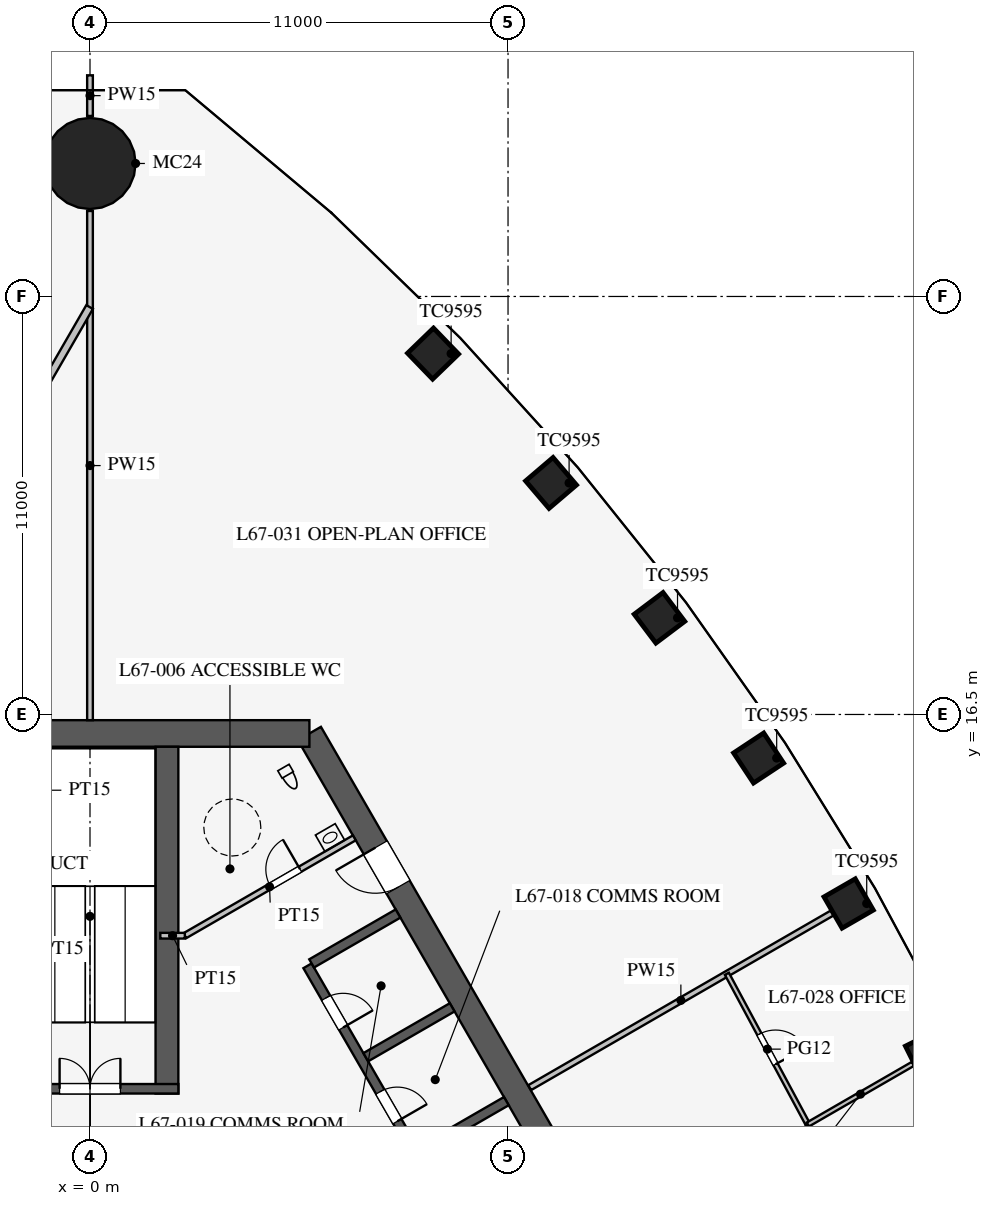
"""IFC4 building model, lengths in metres.
Left out: names, types, materials, properties, quantities, classifications, styles, units other than length and angle.
Written with IfcOpenShell. Run it as: python <this file> out.ifc"""

import sys

from ifc_helpers import new_model, si_unit, direction, frame, frame_2d, origin, origin_2d, place, context, subcontext, project, spatial, rectangle, circle, extrude, element, fill, save


model = new_model("IFC4")
c1 = context("Model", 3, precision=1e-05, world=origin(), true_north=direction((0.0, 1.0)))
c2 = subcontext(c1, "Body", "Model", "MODEL_VIEW")
j1 = project(units=[si_unit("LENGTHUNIT", "METRE"), si_unit("PLANEANGLEUNIT", "RADIAN")], contexts=[c1])
p1 = place(None, origin())
s1 = spatial("IfcSite", under=j1, at=p1, CompositionType="ELEMENT")
p2 = place(p1, origin())
s2 = spatial("IfcBuilding", under=s1, at=p2, CompositionType="ELEMENT")
p3 = place(p2, frame((0.0, 0.0, 293.1)))
s3 = spatial("IfcBuildingStorey", under=s2, at=p3, CompositionType="ELEMENT", Elevation=293.1)
for number, where, z_axis, x_axis in (
    (1, (22.094, 7.56, 0.0), (0.0, 0.0, 1.0), (-0.447, 0.895, 0.0)),
    (2, (19.963, 11.526, 0.0), (0.0, 0.0, 1.0), (-0.5, 0.866, 0.0)),
    (3, (17.594, 15.354, 0.0), (0.0, 0.0, 1.0), (-0.552, 0.834, 0.0)),
    (4, (14.985, 19.044, 0.0), (0.0, 0.0, 1.0), (-0.601, 0.799, 0.0)),
    (5, (12.132, 22.593, 0.0), (0.0, 0.0, 1.0), (-0.649, 0.761, 0.0)),
    (6, (9.027, 25.997, 0.0), (0.0, 0.0, 1.0), (-0.695, 0.719, 0.0)),
):
    element("IfcColumn", number, at=place(p3, frame(where, z_axis=z_axis, x_axis=x_axis)), inside=s3, PredefinedType="COLUMN", context=c2, shape_type="SweptSolid", body=[
        extrude(rectangle(XDim=0.95, YDim=0.95, at=origin_2d()), origin(), (0.0, 0.0, 1.0), 4.2),
    ])
p4 = place(p3, frame((0.0, 31.0, 0.0), z_axis=(0.0, 0.0, 1.0), x_axis=(1.0, 0.0, 0.0)))
e7 = element("IfcColumn", 7, at=p4, inside=s3, PredefinedType="COLUMN", context=c2, shape_type="SweptSolid", body=[
    extrude(circle(Radius=1.2, at=origin_2d()), origin(), (0.0, 0.0, 1.0), 4.2),
])
p5 = place(p3, frame((16.743, -3.0, 0.0), z_axis=(0.0, 0.0, 1.0), x_axis=(-0.500002442456, 0.866023993627, 0.0)))
e8 = element("IfcWall", 8, at=p5, inside=s3, PredefinedType="SHEAR", context=c2, shape_type="SweptSolid", body=[
    extrude(rectangle(XDim=21.939, YDim=0.7, at=frame_2d((10.97, 0.0))), origin(), (0.0, 0.0, 1.0), 4.2),
])
p6 = place(p5, frame((17.27, 0.0, 0.0)))
e9 = element("IfcOpeningElement", 9, at=p6, cuts=e8, PredefinedType="OPENING", context=c2, shape_type="SweptSolid", body=[
    extrude(rectangle(XDim=1.2, YDim=2.1, at=frame_2d((0.6, 1.05))), frame((0.0, 0.36, 0.0), z_axis=(0.0, -1.0, 0.0), x_axis=(1.0, 0.0, 0.0)), (0.0, 0.0, 1.0), 0.72),
])
p7 = place(p5, frame((3.47, 0.0, 0.0)))
e10 = element("IfcOpeningElement", 10, at=p7, cuts=e8, PredefinedType="OPENING", context=c2, shape_type="SweptSolid", body=[
    extrude(rectangle(XDim=1.2, YDim=2.1, at=frame_2d((0.6, 1.05))), frame((0.0, 0.36, 0.0), z_axis=(0.0, -1.0, 0.0), x_axis=(1.0, 0.0, 0.0)), (0.0, 0.0, 1.0), 0.72),
])
p8 = place(p3, frame((5.773, 16.0, 0.0), z_axis=(0.0, 0.0, 1.0), x_axis=(-1.0, 0.0, 0.0)))
e11 = element("IfcWall", 11, at=p8, inside=s3, PredefinedType="SHEAR", context=c2, shape_type="SweptSolid", body=[
    extrude(rectangle(XDim=11.547, YDim=0.7, at=frame_2d((5.773, 0.0))), origin(), (0.0, 0.0, 1.0), 4.2),
])
p9 = place(p3, frame((11.424, 0.014, 0.0), z_axis=(0.0, 0.0, 1.0), x_axis=(-0.500001763848, 0.866024385424, 0.0)))
e12 = element("IfcWall", 12, at=p9, inside=s3, PredefinedType="SHEAR", context=c2, shape_type="SweptSolid", body=[
    extrude(rectangle(XDim=11.4, YDim=0.25, at=frame_2d((5.7, 0.0))), origin(), (0.0, 0.0, 1.0), 4.2),
])
p10 = place(p9, frame((0.975, 0.0, 0.0)))
e13 = element("IfcOpeningElement", 13, at=p10, cuts=e12, PredefinedType="OPENING", context=c2, shape_type="SweptSolid", body=[
    extrude(rectangle(XDim=0.9, YDim=2.1, at=frame_2d((0.45, 1.05))), frame((0.0, 0.135, 0.0), z_axis=(0.0, -1.0, 0.0), x_axis=(1.0, 0.0, 0.0)), (0.0, 0.0, 1.0), 0.27),
])
p11 = place(p9, frame((3.825, 0.0, 0.0)))
e14 = element("IfcOpeningElement", 14, at=p11, cuts=e12, PredefinedType="OPENING", context=c2, shape_type="SweptSolid", body=[
    extrude(rectangle(XDim=0.9, YDim=2.1, at=frame_2d((0.45, 1.05))), frame((0.0, 0.135, 0.0), z_axis=(0.0, -1.0, 0.0), x_axis=(1.0, 0.0, 0.0)), (0.0, 0.0, 1.0), 0.27),
])
p12 = place(p9, frame((6.675, 0.0, 0.0)))
e15 = element("IfcOpeningElement", 15, at=p12, cuts=e12, PredefinedType="OPENING", context=c2, shape_type="SweptSolid", body=[
    extrude(rectangle(XDim=0.9, YDim=2.1, at=frame_2d((0.45, 1.05))), frame((0.0, 0.135, 0.0), z_axis=(0.0, -1.0, 0.0), x_axis=(1.0, 0.0, 0.0)), (0.0, 0.0, 1.0), 0.27),
])
p13 = place(p9, frame((9.525, 0.0, 0.0)))
e16 = element("IfcOpeningElement", 16, at=p13, cuts=e12, PredefinedType="OPENING", context=c2, shape_type="SweptSolid", body=[
    extrude(rectangle(XDim=0.9, YDim=2.1, at=frame_2d((0.45, 1.05))), frame((0.0, 0.135, 0.0), z_axis=(0.0, -1.0, 0.0), x_axis=(1.0, 0.0, 0.0)), (0.0, 0.0, 1.0), 0.27),
])
for number, where, z_axis, x_axis in (
    (17, (8.682, 5.012, 0.0), (0.0, 0.0, 1.0), (0.866, 0.5, 0.0)),
    (18, (7.257, 7.481, 0.0), (0.0, 0.0, 1.0), (0.866, 0.5, 0.0)),
    (19, (5.832, 9.949, 0.0), (0.0, 0.0, 1.0), (0.866, 0.5, 0.0)),
):
    element("IfcWall", number, at=place(p3, frame(where, z_axis=z_axis, x_axis=x_axis)), inside=s3, PredefinedType="SHEAR", context=c2, shape_type="SweptSolid", body=[
        extrude(rectangle(XDim=2.625, YDim=0.25, at=frame_2d((1.312, 0.0))), origin(), (0.0, 0.0, 1.0), 4.2),
    ])
p14 = place(p3, frame((2.025, 6.525, 0.0), z_axis=(0.0, 0.0, 1.0), x_axis=(0.0, 1.0, 0.0)))
e20 = element("IfcWall", 20, at=p14, inside=s3, PredefinedType="SHEAR", context=c2, shape_type="SweptSolid", body=[
    extrude(rectangle(XDim=9.125, YDim=0.6, at=frame_2d((4.562, 0.0))), origin(), (0.0, 0.0, 1.0), 4.2),
])
p15 = place(p3, frame((2.325, 6.65, 0.0), z_axis=(0.0, 0.0, 1.0), x_axis=(-1.0, 0.0, 0.0)))
e21 = element("IfcWall", 21, at=p15, inside=s3, PredefinedType="SHEAR", context=c2, shape_type="SweptSolid", body=[
    extrude(rectangle(XDim=4.65, YDim=0.25, at=frame_2d((2.325, 0.0))), origin(), (0.0, 0.0, 1.0), 4.2),
])
p16 = place(p15, frame((1.525, 0.0, 0.0)))
e22 = element("IfcOpeningElement", 22, at=p16, cuts=e21, PredefinedType="OPENING", context=c2, shape_type="SweptSolid", body=[
    extrude(rectangle(XDim=1.6, YDim=2.1, at=frame_2d((0.8, 1.05))), frame((0.0, 0.135, 0.0), z_axis=(0.0, -1.0, 0.0), x_axis=(1.0, 0.0, 0.0)), (0.0, 0.0, 1.0), 0.27),
])
p17 = place(p3, frame((2.495, 10.678, 0.0), z_axis=(0.0, 0.0, 1.0), x_axis=(0.866037967349, 0.499978238636, 0.0)))
e23 = element("IfcWall", 23, at=p17, inside=s3, PredefinedType="PARTITIONING", context=c2, shape_type="SweptSolid", body=[
    extrude(rectangle(XDim=5.15, YDim=0.15, at=frame_2d((2.575, 0.0))), origin(), (0.0, 0.0, 1.0), 4.0),
])
p18 = place(p17, frame((2.6, 0.0, 0.0)))
e24 = element("IfcOpeningElement", 24, at=p18, cuts=e23, PredefinedType="OPENING", context=c2, shape_type="SweptSolid", body=[
    extrude(rectangle(XDim=0.9, YDim=2.1, at=frame_2d((0.45, 1.05))), frame((0.0, 0.085, 0.0), z_axis=(0.0, -1.0, 0.0), x_axis=(1.0, 0.0, 0.0)), (0.0, 0.0, 1.0), 0.17),
])
p19 = place(p3, frame((2.495, 10.678, 0.0), z_axis=(0.0, 0.0, 1.0), x_axis=(-1.0, 0.0, 0.0)))
e25 = element("IfcWall", 25, at=p19, inside=s3, PredefinedType="PARTITIONING", context=c2, shape_type="SweptSolid", body=[
    extrude(rectangle(XDim=0.645, YDim=0.15, at=frame_2d((0.323, 0.0))), origin(), (0.0, 0.0, 1.0), 4.0),
])
p20 = place(p3, frame((0.0, 16.35, 0.0), z_axis=(0.0, 0.0, 1.0), x_axis=(0.0, 1.0, 0.0)))
e26 = element("IfcWall", 26, at=p20, inside=s3, PredefinedType="PARTITIONING", context=c2, shape_type="SweptSolid", body=[
    extrude(rectangle(XDim=13.4, YDim=0.15, at=frame_2d((6.7, 0.0))), origin(), (0.0, 0.0, 1.0), 2.5),
])
p21 = place(p3, frame((0.0, 32.25, 0.0), z_axis=(0.0, 0.0, 1.0), x_axis=(0.0, 1.0, 0.0)))
e27 = element("IfcWall", 27, at=p21, inside=s3, PredefinedType="PARTITIONING", context=c2, shape_type="SweptSolid", body=[
    extrude(rectangle(XDim=1.07, YDim=0.15, at=frame_2d((0.535, 0.0))), origin(), (0.0, 0.0, 1.0), 2.5),
])
p22 = place(p3, frame((11.57, 6.68, 0.0), z_axis=(0.0, 0.0, 1.0), x_axis=(0.866026706704, 0.49999774327, 0.0)))
e28 = element("IfcWall", 28, at=p22, inside=s3, PredefinedType="PARTITIONING", context=c2, shape_type="SweptSolid", body=[
    extrude(rectangle(XDim=9.187, YDim=0.15, at=frame_2d((4.593, 0.0))), origin(), (0.0, 0.0, 1.0), 3.3),
])
p23 = place(p3, frame((18.891, 5.71, 0.0), z_axis=(0.0, 0.0, 1.0), x_axis=(-0.473524102582, 0.880780860529, 0.0)))
e29 = element("IfcWall", 29, at=p23, inside=s3, PredefinedType="PARTITIONING", context=c2, shape_type="SweptSolid", body=[
    extrude(rectangle(XDim=4.502, YDim=0.12, at=frame_2d((2.251, 0.0))), origin(), (0.0, 0.0, 1.0), 2.9),
])
p24 = place(p23, frame((1.8, 0.0, 0.15)))
e30 = element("IfcOpeningElement", 30, at=p24, cuts=e29, PredefinedType="OPENING", context=c2, shape_type="SweptSolid", body=[
    extrude(rectangle(XDim=0.9, YDim=2.1, at=frame_2d((0.45, 1.05))), frame((0.0, 0.07, 0.0), z_axis=(0.0, -1.0, 0.0), x_axis=(1.0, 0.0, 0.0)), (0.0, 0.0, 1.0), 0.14),
])
p25 = place(p3, frame((20.786, 1.608, 0.0), z_axis=(0.0, 0.0, 1.0), x_axis=(-0.419335693458, 0.907831248742, 0.0)))
e31 = element("IfcWall", 31, at=p25, inside=s3, PredefinedType="PARTITIONING", context=c2, shape_type="SweptSolid", body=[
    extrude(rectangle(XDim=4.519, YDim=0.12, at=frame_2d((2.259, 0.0))), origin(), (0.0, 0.0, 1.0), 2.9),
])
p26 = place(p25, frame((1.8, 0.0, 0.15)))
e32 = element("IfcOpeningElement", 32, at=p26, cuts=e31, PredefinedType="OPENING", context=c2, shape_type="SweptSolid", body=[
    extrude(rectangle(XDim=0.9, YDim=2.1, at=frame_2d((0.45, 1.05))), frame((0.0, 0.07, 0.0), z_axis=(0.0, -1.0, 0.0), x_axis=(1.0, 0.0, 0.0)), (0.0, 0.0, 1.0), 0.14),
])
p27 = place(p3, frame((18.891, 5.71, 0.0), z_axis=(0.0, 0.0, 1.0), x_axis=(0.866008575759, 0.500029145862, 0.0)))
e33 = element("IfcWall", 33, at=p27, inside=s3, PredefinedType="PARTITIONING", context=c2, shape_type="SweptSolid", body=[
    extrude(rectangle(XDim=3.193, YDim=0.12, at=frame_2d((1.596, 0.0))), origin(), (0.0, 0.0, 1.0), 2.9),
])
p28 = place(p3, frame((-5.045, 18.501, 0.0), z_axis=(0.0, 0.0, 1.0), x_axis=(0.499990381663, 0.866030956863, 0.0)))
e34 = element("IfcWall", 34, at=p28, inside=s3, PredefinedType="PARTITIONING", context=c2, shape_type="SweptSolid", body=[
    extrude(rectangle(XDim=10.07, YDim=0.2, at=frame_2d((5.035, 0.0))), origin(), (0.0, 0.0, 1.0), 2.9),
])
p29 = place(p28, frame((1.25, 0.0, 0.15)))
e35 = element("IfcOpeningElement", 35, at=p29, cuts=e34, PredefinedType="OPENING", context=c2, shape_type="SweptSolid", body=[
    extrude(rectangle(XDim=1.8, YDim=2.1, at=frame_2d((0.9, 1.05))), frame((0.0, 0.11, 0.0), z_axis=(0.0, -1.0, 0.0), x_axis=(1.0, 0.0, 0.0)), (0.0, 0.0, 1.0), 0.22),
])
p30 = place(p18, origin())
e36 = element("IfcDoor", 36, at=p30, inside=s3, OperationType="SINGLE_SWING_RIGHT", PredefinedType="DOOR", context=c2, shape_type="SweptSolid", body=[
    extrude(rectangle(XDim=0.9, YDim=2.1, at=frame_2d((0.45, 1.05))), frame((0.0, 0.025, 0.0), z_axis=(0.0, -1.0, 0.0), x_axis=(1.0, 0.0, 0.0)), (0.0, 0.0, 1.0), 0.05),
])
fill(e24, e36)
p31 = place(p16, frame((1.6, 0.0, 0.0), z_axis=(0.0, 0.0, 1.0), x_axis=(-1.0, 0.0, 0.0)))
e37 = element("IfcDoor", 37, at=p31, inside=s3, OperationType="DOUBLE_DOOR_SINGLE_SWING", PredefinedType="DOOR", context=c2, shape_type="SweptSolid", body=[
    extrude(rectangle(XDim=1.6, YDim=2.1, at=frame_2d((0.8, 1.05))), frame((0.0, 0.025, 0.0), z_axis=(0.0, -1.0, 0.0), x_axis=(1.0, 0.0, 0.0)), (0.0, 0.0, 1.0), 0.05),
])
fill(e22, e37)
p32 = place(p6, origin())
e38 = element("IfcDoor", 38, at=p32, inside=s3, OperationType="SINGLE_SWING_RIGHT", PredefinedType="DOOR", context=c2, shape_type="SweptSolid", body=[
    extrude(rectangle(XDim=1.2, YDim=2.1, at=frame_2d((0.6, 1.05))), frame((0.0, 0.025, 0.0), z_axis=(0.0, -1.0, 0.0), x_axis=(1.0, 0.0, 0.0)), (0.0, 0.0, 1.0), 0.05),
])
fill(e9, e38)
p33 = place(p12, frame((0.9, 0.0, 0.0), z_axis=(0.0, 0.0, 1.0), x_axis=(-1.0, 0.0, 0.0)))
e39 = element("IfcDoor", 39, at=p33, inside=s3, OperationType="SINGLE_SWING_RIGHT", PredefinedType="DOOR", context=c2, shape_type="SweptSolid", body=[
    extrude(rectangle(XDim=0.9, YDim=2.1, at=frame_2d((0.45, 1.05))), frame((0.0, 0.025, 0.0), z_axis=(0.0, -1.0, 0.0), x_axis=(1.0, 0.0, 0.0)), (0.0, 0.0, 1.0), 0.05),
])
fill(e15, e39)
p34 = place(p13, frame((0.9, 0.0, 0.0), z_axis=(0.0, 0.0, 1.0), x_axis=(-1.0, 0.0, 0.0)))
e40 = element("IfcDoor", 40, at=p34, inside=s3, OperationType="SINGLE_SWING_RIGHT", PredefinedType="DOOR", context=c2, shape_type="SweptSolid", body=[
    extrude(rectangle(XDim=0.9, YDim=2.1, at=frame_2d((0.45, 1.05))), frame((0.0, 0.025, 0.0), z_axis=(0.0, -1.0, 0.0), x_axis=(1.0, 0.0, 0.0)), (0.0, 0.0, 1.0), 0.05),
])
fill(e16, e40)
p35 = place(p24, frame((0.9, 0.0, 0.0), z_axis=(0.0, 0.0, 1.0), x_axis=(-1.0, 0.0, 0.0)))
e41 = element("IfcDoor", 41, at=p35, inside=s3, OperationType="SINGLE_SWING_RIGHT", PredefinedType="DOOR", context=c2, shape_type="SweptSolid", body=[
    extrude(rectangle(XDim=0.9, YDim=2.1, at=frame_2d((0.45, 1.05))), frame((0.0, 0.025, 0.0), z_axis=(0.0, -1.0, 0.0), x_axis=(1.0, 0.0, 0.0)), (0.0, 0.0, 1.0), 0.05),
])
fill(e30, e41)
save(model, sys.argv[1])
